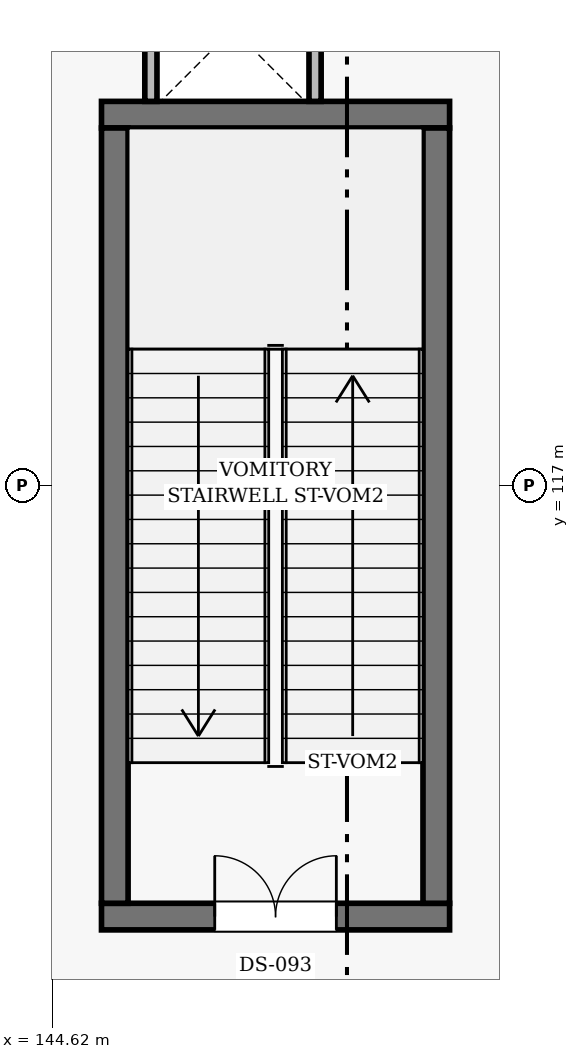
"""IFC4 building model, lengths in metres.
Left out: names, types, materials, properties, quantities, classifications, styles, units other than length and angle.
Written with IfcOpenShell. Run it as: python <this file> out.ifc"""

import sys

from ifc_helpers import new_model, si_unit, direction, frame, frame_2d, origin, place, context, subcontext, project, spatial, rectangle, extrude, element, fill, save


model = new_model("IFC4")
c1 = context("Model", 3, precision=1e-05, world=origin(), true_north=direction((0.0, 1.0)))
c2 = subcontext(c1, "Body", "Model", "MODEL_VIEW")
j1 = project(units=[si_unit("LENGTHUNIT", "METRE"), si_unit("PLANEANGLEUNIT", "RADIAN")], contexts=[c1])
p1 = place(None, origin())
s1 = spatial("IfcSite", under=j1, at=p1, CompositionType="ELEMENT")
p2 = place(p1, origin())
s2 = spatial("IfcBuilding", under=s1, at=p2, CompositionType="ELEMENT")
p3 = place(p2, origin())
s3 = spatial("IfcBuildingStorey", under=s2, at=p3, CompositionType="ELEMENT", Elevation=0.0)
p4 = place(p3, frame((145.27, 111.325, 0.0), z_axis=(0.0, 0.0, 1.0), x_axis=(1.0, 0.0, 0.0)))
e1 = element("IfcWall", 1, at=p4, inside=s3, PredefinedType="SHEAR", context=c2, shape_type="SweptSolid", body=[
    extrude(rectangle(XDim=4.58, YDim=0.35, at=frame_2d((2.29, 0.0))), origin(), (0.0, 0.0, 1.0), 5.16),
])
p5 = place(p4, frame((1.49, 0.0, 0.0)))
e2 = element("IfcOpeningElement", 2, at=p5, cuts=e1, PredefinedType="OPENING", context=c2, shape_type="SweptSolid", body=[
    extrude(rectangle(XDim=1.6, YDim=2.2, at=frame_2d((0.8, 1.1))), frame((0.0, 0.185, 0.0), z_axis=(0.0, -1.0, 0.0), x_axis=(1.0, 0.0, 0.0)), (0.0, 0.0, 1.0), 0.37),
])
p6 = place(p3, frame((149.85, 121.875, 0.0), z_axis=(0.0, 0.0, 1.0), x_axis=(-1.0, 0.0, 0.0)))
e3 = element("IfcWall", 3, at=p6, inside=s3, PredefinedType="SHEAR", context=c2, shape_type="SweptSolid", body=[
    extrude(rectangle(XDim=4.58, YDim=0.35, at=frame_2d((2.29, 0.0))), origin(), (0.0, 0.0, 1.0), 5.16),
])
for number, where, z_axis, x_axis in (
    (4, (145.445, 121.7, 0.0), (0.0, 0.0, 1.0), (0.0, -1.0, 0.0)),
    (5, (149.675, 111.5, 0.0), (0.0, 0.0, 1.0), (0.0, 1.0, 0.0)),
):
    element("IfcWall", number, at=place(p3, frame(where, z_axis=z_axis, x_axis=x_axis)), inside=s3, PredefinedType="SHEAR", context=c2, shape_type="SweptSolid", body=[
        extrude(rectangle(XDim=10.2, YDim=0.35, at=frame_2d((5.1, 0.0))), origin(), (0.0, 0.0, 1.0), 5.16),
    ])
for number, where, z_axis, x_axis in (
    (6, (148.08, 122.05, 0.0), (0.0, 0.0, 1.0), (0.0, 1.0, 0.0)),
    (7, (145.92, 124.0, 0.0), (0.0, 0.0, 1.0), (0.0, -1.0, 0.0)),
):
    element("IfcWall", number, at=place(p3, frame(where, z_axis=z_axis, x_axis=x_axis)), inside=s3, PredefinedType="PARTITIONING", context=c2, shape_type="SweptSolid", body=[
        extrude(rectangle(XDim=1.95, YDim=0.16, at=frame_2d((0.975, 0.0))), origin(), (0.0, 0.0, 1.0), 5.18),
    ])
p7 = place(p5, origin())
e8 = element("IfcDoor", 8, at=p7, inside=s3, OperationType="DOUBLE_DOOR_SINGLE_SWING", PredefinedType="DOOR", context=c2, shape_type="SweptSolid", body=[
    extrude(rectangle(XDim=1.6, YDim=2.2, at=frame_2d((0.8, 1.1))), frame((0.0, 0.025, 0.0), z_axis=(0.0, -1.0, 0.0), x_axis=(1.0, 0.0, 0.0)), (0.0, 0.0, 1.0), 0.05),
])
fill(e2, e8)
save(model, sys.argv[1])
